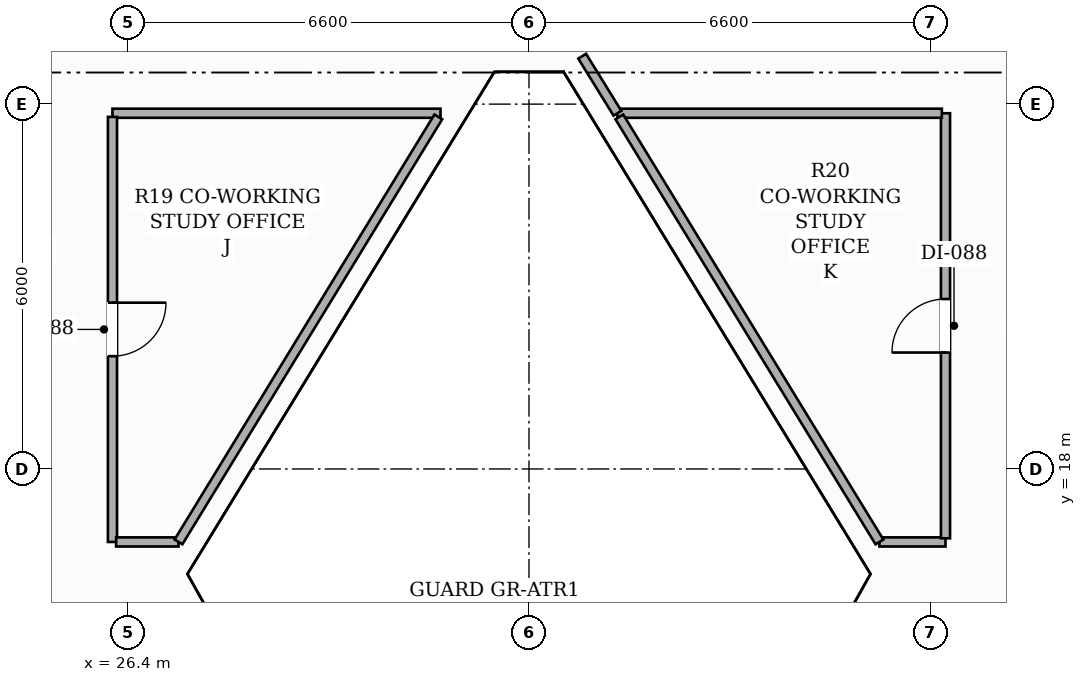
"""IFC4 building model, lengths in metres.
Left out: names, types, materials, properties, quantities, classifications, styles, units other than length and angle.
Written with IfcOpenShell. Run it as: python <this file> out.ifc"""

import sys

from ifc_helpers import new_model, si_unit, direction, frame, frame_2d, origin, place, context, subcontext, project, spatial, rectangle, extrude, element, fill, save


model = new_model("IFC4")
c1 = context("Model", 3, precision=1e-05, world=origin(), true_north=direction((0.0, 1.0)))
c2 = subcontext(c1, "Body", "Model", "MODEL_VIEW")
j1 = project(units=[si_unit("LENGTHUNIT", "METRE"), si_unit("PLANEANGLEUNIT", "RADIAN")], contexts=[c1])
p1 = place(None, origin())
s1 = spatial("IfcSite", under=j1, at=p1, CompositionType="ELEMENT")
p2 = place(p1, origin())
s2 = spatial("IfcBuilding", under=s1, at=p2, CompositionType="ELEMENT")
p3 = place(p2, frame((0.0, 0.0, 36.8)))
s3 = spatial("IfcBuildingStorey", under=s2, at=p3, CompositionType="ELEMENT", Elevation=36.8)
p4 = place(p3, frame((31.545, 23.85, 0.0), z_axis=(0.0, 0.0, 1.0), x_axis=(-1.0, 0.0, 0.0)))
e1 = element("IfcWall", 1, at=p4, inside=s3, PredefinedType="PARTITIONING", context=c2, shape_type="SweptSolid", body=[
    extrude(rectangle(XDim=5.395, YDim=0.15, at=frame_2d((2.698, 0.0))), origin(), (0.0, 0.0, 1.0), 2.669),
])
p5 = place(p3, frame((26.15, 23.79, 0.0), z_axis=(0.0, 0.0, 1.0), x_axis=(0.0, -1.0, 0.0)))
e2 = element("IfcWall", 2, at=p5, inside=s3, PredefinedType="PARTITIONING", context=c2, shape_type="SweptSolid", body=[
    extrude(rectangle(XDim=6.99, YDim=0.15, at=frame_2d((3.495, 0.0))), origin(), (0.0, 0.0, 1.0), 2.669),
])
p6 = place(p5, frame((3.055, 0.0, 0.0)))
e3 = element("IfcOpeningElement", 3, at=p6, cuts=e2, PredefinedType="OPENING", context=c2, shape_type="SweptSolid", body=[
    extrude(rectangle(XDim=0.88, YDim=2.1, at=frame_2d((0.44, 1.05))), frame((0.0, 0.085, 0.0), z_axis=(0.0, -1.0, 0.0), x_axis=(1.0, 0.0, 0.0)), (0.0, 0.0, 1.0), 0.17),
])
p7 = place(p3, frame((26.21, 16.8, 0.0), z_axis=(0.0, 0.0, 1.0), x_axis=(1.0, 0.0, 0.0)))
e4 = element("IfcWall", 4, at=p7, inside=s3, PredefinedType="PARTITIONING", context=c2, shape_type="SweptSolid", body=[
    extrude(rectangle(XDim=1.026, YDim=0.15, at=frame_2d((0.513, 0.0))), origin(), (0.0, 0.0, 1.0), 3.06),
])
p8 = place(p3, frame((38.764, 16.8, 0.0), z_axis=(0.0, 0.0, 1.0), x_axis=(1.0, 0.0, 0.0)))
e5 = element("IfcWall", 5, at=p8, inside=s3, PredefinedType="PARTITIONING", context=c2, shape_type="SweptSolid", body=[
    extrude(rectangle(XDim=1.086, YDim=0.15, at=frame_2d((0.543, 0.0))), origin(), (0.0, 0.0, 1.0), 3.06),
])
p9 = place(p3, frame((39.85, 16.86, 0.0), z_axis=(0.0, 0.0, 1.0), x_axis=(0.0, 1.0, 0.0)))
e6 = element("IfcWall", 6, at=p9, inside=s3, PredefinedType="PARTITIONING", context=c2, shape_type="SweptSolid", body=[
    extrude(rectangle(XDim=6.99, YDim=0.15, at=frame_2d((3.495, 0.0))), origin(), (0.0, 0.0, 1.0), 2.669),
])
p10 = place(p9, frame((3.055, 0.0, 0.0)))
e7 = element("IfcOpeningElement", 7, at=p10, cuts=e6, PredefinedType="OPENING", context=c2, shape_type="SweptSolid", body=[
    extrude(rectangle(XDim=0.88, YDim=2.1, at=frame_2d((0.44, 1.05))), frame((0.0, 0.085, 0.0), z_axis=(0.0, -1.0, 0.0), x_axis=(1.0, 0.0, 0.0)), (0.0, 0.0, 1.0), 0.17),
])
p11 = place(p3, frame((39.79, 23.85, 0.0), z_axis=(0.0, 0.0, 1.0), x_axis=(-1.0, 0.0, 0.0)))
e8 = element("IfcWall", 8, at=p11, inside=s3, PredefinedType="PARTITIONING", context=c2, shape_type="SweptSolid", body=[
    extrude(rectangle(XDim=5.335, YDim=0.15, at=frame_2d((2.667, 0.0))), origin(), (0.0, 0.0, 1.0), 2.669),
])
p12 = place(p3, frame((34.455, 23.85, 0.0), z_axis=(0.0, 0.0, 1.0), x_axis=(-0.525973516201, 0.850500946652, 0.0)))
e9 = element("IfcWall", 9, at=p12, inside=s3, PredefinedType="PARTITIONING", context=c2, shape_type="SweptSolid", body=[
    extrude(rectangle(XDim=1.103, YDim=0.15, at=frame_2d((0.551, 0.0))), origin(), (0.0, 0.0, 1.0), 3.06),
])
p13 = place(p3, frame((27.236, 16.801, 0.0), z_axis=(0.0, 0.0, 1.0), x_axis=(0.521617567684, 0.853179414358, 0.0)))
e10 = element("IfcWall", 10, at=p13, inside=s3, PredefinedType="PARTITIONING", context=c2, shape_type="SweptSolid", body=[
    extrude(rectangle(XDim=8.192, YDim=0.15, at=frame_2d((4.096, 0.0))), origin(), (0.0, 0.0, 1.0), 2.669),
])
p14 = place(p3, frame((34.486, 23.79, 0.0), z_axis=(0.0, 0.0, 1.0), x_axis=(0.521998190399, -0.852946592244, 0.0)))
e11 = element("IfcWall", 11, at=p14, inside=s3, PredefinedType="PARTITIONING", context=c2, shape_type="SweptSolid", body=[
    extrude(rectangle(XDim=8.195, YDim=0.15, at=frame_2d((4.098, 0.0))), origin(), (0.0, 0.0, 1.0), 2.669),
])
p15 = place(p6, origin())
e12 = element("IfcDoor", 12, at=p15, inside=s3, OperationType="SINGLE_SWING_LEFT", PredefinedType="DOOR", context=c2, shape_type="SweptSolid", body=[
    extrude(rectangle(XDim=0.88, YDim=2.1, at=frame_2d((0.44, 1.05))), frame((0.0, 0.025, 0.0), z_axis=(0.0, -1.0, 0.0), x_axis=(1.0, 0.0, 0.0)), (0.0, 0.0, 1.0), 0.05),
])
fill(e3, e12)
p16 = place(p10, origin())
e13 = element("IfcDoor", 13, at=p16, inside=s3, OperationType="SINGLE_SWING_LEFT", PredefinedType="DOOR", context=c2, shape_type="SweptSolid", body=[
    extrude(rectangle(XDim=0.88, YDim=2.1, at=frame_2d((0.44, 1.05))), frame((0.0, 0.025, 0.0), z_axis=(0.0, -1.0, 0.0), x_axis=(1.0, 0.0, 0.0)), (0.0, 0.0, 1.0), 0.05),
])
fill(e7, e13)
save(model, sys.argv[1])
